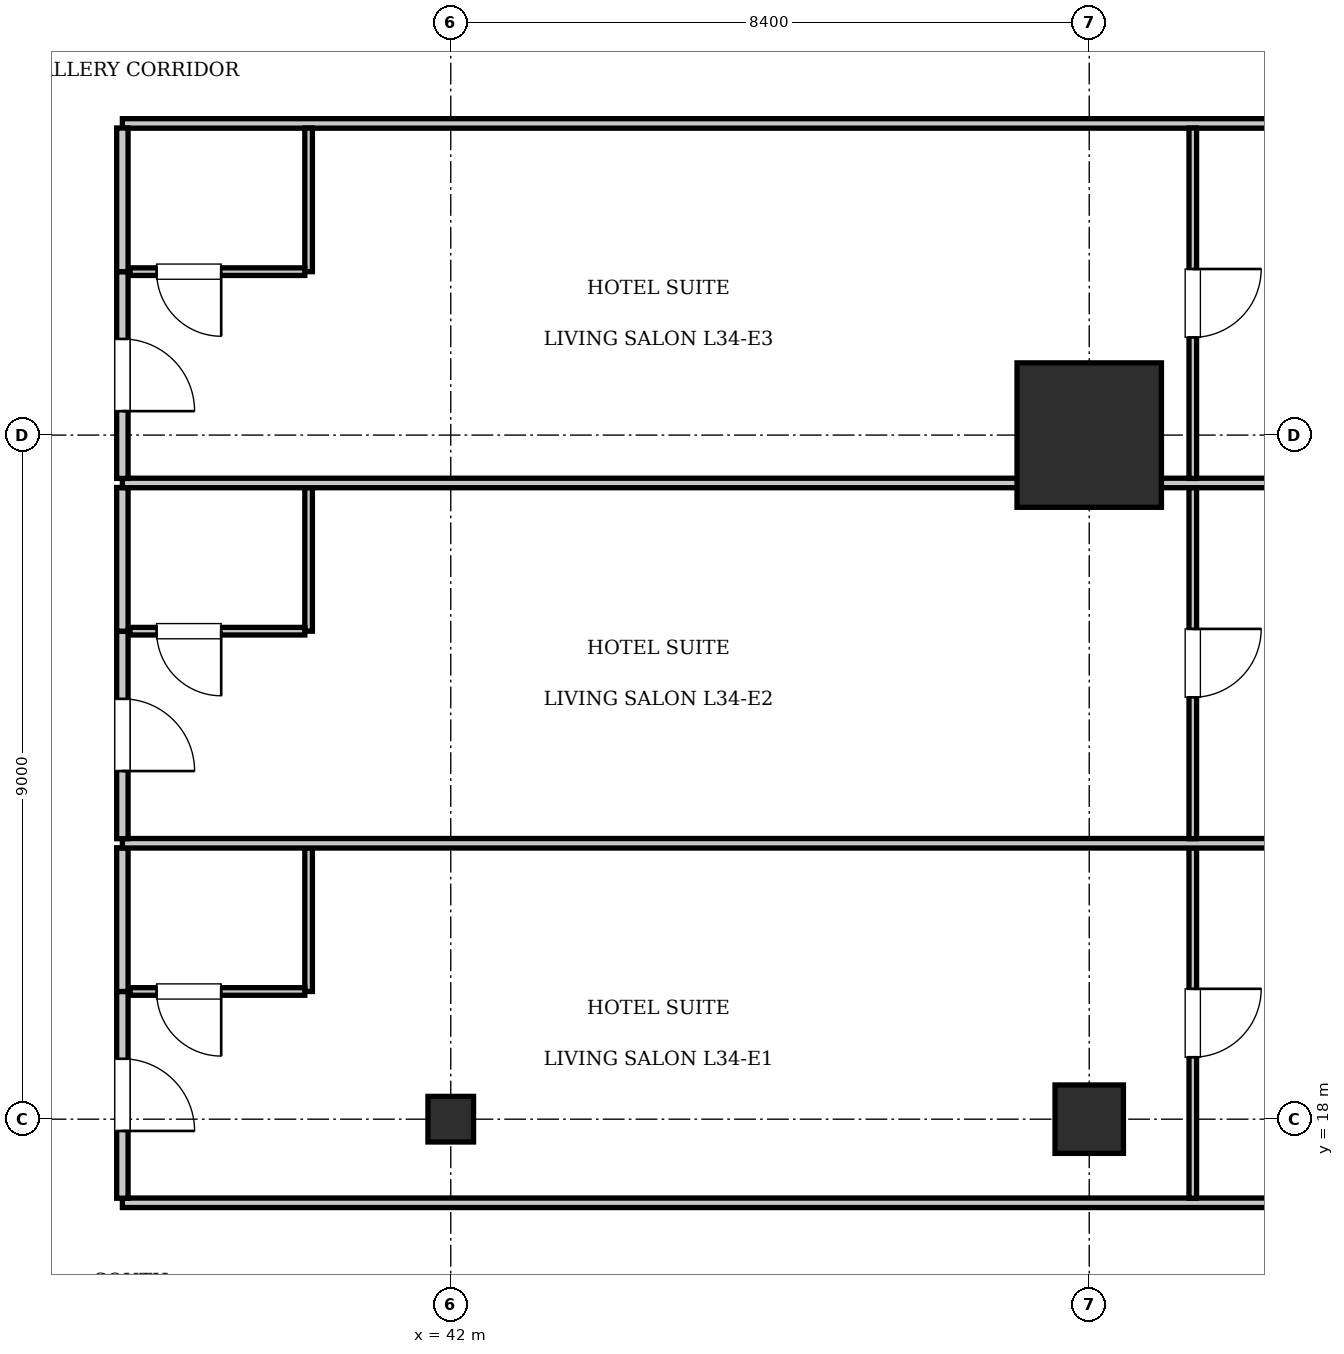
"""IFC4 building model, lengths in metres.
Left out: names, types, materials, properties, quantities, classifications, styles, units other than length and angle.
Written with IfcOpenShell. Run it as: python <this file> out.ifc"""

import sys

from ifc_helpers import new_model, si_unit, direction, frame, frame_2d, origin, origin_2d, place, context, subcontext, project, spatial, rectangle, i_section, extrude, element, fill, save


model = new_model("IFC4")
c1 = context("Model", 3, precision=1e-05, world=origin(), true_north=direction((0.0, 1.0)))
c2 = subcontext(c1, "Body", "Model", "MODEL_VIEW")
j1 = project(units=[si_unit("LENGTHUNIT", "METRE"), si_unit("PLANEANGLEUNIT", "RADIAN")], contexts=[c1])
p1 = place(None, origin())
s1 = spatial("IfcSite", under=j1, at=p1, CompositionType="ELEMENT")
p2 = place(p1, origin())
s2 = spatial("IfcBuilding", under=s1, at=p2, CompositionType="ELEMENT")
p3 = place(p2, frame((0.0, 0.0, 142.8)))
s3 = spatial("IfcBuildingStorey", under=s2, at=p3, CompositionType="ELEMENT", Elevation=142.8)
p4 = place(p3, frame((50.4, 27.0, 0.0), z_axis=(0.0, 0.0, 1.0), x_axis=(1.0, 0.0, 0.0)))
e1 = element("IfcColumn", 1, at=p4, inside=s3, PredefinedType="COLUMN", context=c2, shape_type="SweptSolid", body=[
    extrude(rectangle(XDim=1.9, YDim=1.9, at=origin_2d()), origin(), (0.0, 0.0, 1.0), 3.85),
])
p5 = place(p3, frame((50.4, 18.0, 0.0), z_axis=(0.0, 0.0, 1.0), x_axis=(1.0, 0.0, 0.0)))
e2 = element("IfcColumn", 2, at=p5, inside=s3, PredefinedType="COLUMN", context=c2, shape_type="SweptSolid", body=[
    extrude(rectangle(XDim=0.9, YDim=0.9, at=origin_2d()), origin(), (0.0, 0.0, 1.0), 3.85),
])
p6 = place(p3, frame((42.0, 18.0, 0.0), z_axis=(0.0, 0.0, 1.0), x_axis=(1.0, 0.0, 0.0)))
e3 = element("IfcColumn", 3, at=p6, inside=s3, PredefinedType="COLUMN", context=c2, shape_type="SweptSolid", body=[
    extrude(i_section(OverallWidth=0.6, OverallDepth=0.6, WebThickness=0.025, FlangeThickness=0.038, at=origin_2d()), origin(), (0.0, 0.0, 1.0), 3.85),
])
for number, where, z_axis, x_axis in (
    (4, (37.68, 16.9, 0.0), (0.0, 0.0, 1.0), (1.0, 0.0, 0.0)),
    (5, (37.68, 31.1, 0.0), (0.0, 0.0, 1.0), (1.0, 0.0, 0.0)),
):
    element("IfcWall", number, at=place(p3, frame(where, z_axis=z_axis, x_axis=x_axis)), inside=s3, PredefinedType="PARTITIONING", context=c2, shape_type="SweptSolid", body=[
        extrude(rectangle(XDim=24.72, YDim=0.125, at=frame_2d((12.36, 0.0))), origin(), (0.0, 0.0, 1.0), 3.61),
    ])
p7 = place(p3, frame((37.68, 16.96, 0.0), z_axis=(0.0, 0.0, 1.0), x_axis=(0.0, 1.0, 0.0)))
e6 = element("IfcWall", 6, at=p7, inside=s3, PredefinedType="PARTITIONING", context=c2, shape_type="SweptSolid", body=[
    extrude(rectangle(XDim=2.72, YDim=0.15, at=frame_2d((1.36, 0.0))), origin(), (0.0, 0.0, 1.0), 3.304),
])
p8 = place(p7, frame((0.885, 0.0, 0.0)))
e7 = element("IfcOpeningElement", 7, at=p8, cuts=e6, PredefinedType="OPENING", context=c2, shape_type="SweptSolid", body=[
    extrude(rectangle(XDim=0.95, YDim=2.15, at=frame_2d((0.475, 1.075))), frame((0.0, 0.085, 0.0), z_axis=(0.0, -1.0, 0.0), x_axis=(1.0, 0.0, 0.0)), (0.0, 0.0, 1.0), 0.17),
])
p9 = place(p3, frame((37.68, 19.68, 0.0), z_axis=(0.0, 0.0, 1.0), x_axis=(0.0, 1.0, 0.0)))
e8 = element("IfcWall", 8, at=p9, inside=s3, PredefinedType="PARTITIONING", context=c2, shape_type="SweptSolid", body=[
    extrude(rectangle(XDim=1.89, YDim=0.15, at=frame_2d((0.945, 0.0))), origin(), (0.0, 0.0, 1.0), 3.61),
])
p10 = place(p3, frame((40.13, 19.68, 0.0), z_axis=(0.0, 0.0, 1.0), x_axis=(0.0, 1.0, 0.0)))
e9 = element("IfcWall", 9, at=p10, inside=s3, PredefinedType="PARTITIONING", context=c2, shape_type="SweptSolid", body=[
    extrude(rectangle(XDim=1.89, YDim=0.1, at=frame_2d((0.945, 0.0))), origin(), (0.0, 0.0, 1.0), 3.61),
])
p11 = place(p3, frame((37.78, 19.68, 0.0), z_axis=(0.0, 0.0, 1.0), x_axis=(1.0, 0.0, 0.0)))
e10 = element("IfcWall", 10, at=p11, inside=s3, PredefinedType="PARTITIONING", context=c2, shape_type="SweptSolid", body=[
    extrude(rectangle(XDim=2.3, YDim=0.1, at=frame_2d((1.15, 0.0))), origin(), (0.0, 0.0, 1.0), 3.61),
])
p12 = place(p11, frame((0.35, 0.0, 0.0)))
e11 = element("IfcOpeningElement", 11, at=p12, cuts=e10, PredefinedType="OPENING", context=c2, shape_type="SweptSolid", body=[
    extrude(rectangle(XDim=0.85, YDim=2.1, at=frame_2d((0.425, 1.05))), frame((0.0, 0.06, 0.0), z_axis=(0.0, -1.0, 0.0), x_axis=(1.0, 0.0, 0.0)), (0.0, 0.0, 1.0), 0.12),
])
p13 = place(p3, frame((51.762, 16.96, 0.0), z_axis=(0.0, 0.0, 1.0), x_axis=(0.0, 1.0, 0.0)))
e12 = element("IfcWall", 12, at=p13, inside=s3, PredefinedType="PARTITIONING", context=c2, shape_type="SweptSolid", body=[
    extrude(rectangle(XDim=4.61, YDim=0.1, at=frame_2d((2.305, 0.0))), origin(), (0.0, 0.0, 1.0), 3.61),
])
p14 = place(p13, frame((1.855, 0.0, 0.0)))
e13 = element("IfcOpeningElement", 13, at=p14, cuts=e12, PredefinedType="OPENING", context=c2, shape_type="SweptSolid", body=[
    extrude(rectangle(XDim=0.9, YDim=2.1, at=frame_2d((0.45, 1.05))), frame((0.0, 0.06, 0.0), z_axis=(0.0, -1.0, 0.0), x_axis=(1.0, 0.0, 0.0)), (0.0, 0.0, 1.0), 0.12),
])
p15 = place(p3, frame((37.68, 21.63, 0.0), z_axis=(0.0, 0.0, 1.0), x_axis=(1.0, 0.0, 0.0)))
e14 = element("IfcWall", 14, at=p15, inside=s3, PredefinedType="PARTITIONING", context=c2, shape_type="SweptSolid", body=[
    extrude(rectangle(XDim=24.72, YDim=0.125, at=frame_2d((12.36, 0.0))), origin(), (0.0, 0.0, 1.0), 3.61),
])
p16 = place(p3, frame((37.68, 21.69, 0.0), z_axis=(0.0, 0.0, 1.0), x_axis=(0.0, 1.0, 0.0)))
e15 = element("IfcWall", 15, at=p16, inside=s3, PredefinedType="PARTITIONING", context=c2, shape_type="SweptSolid", body=[
    extrude(rectangle(XDim=2.73, YDim=0.15, at=frame_2d((1.365, 0.0))), origin(), (0.0, 0.0, 1.0), 3.61),
])
p17 = place(p16, frame((0.89, 0.0, 0.0)))
e16 = element("IfcOpeningElement", 16, at=p17, cuts=e15, PredefinedType="OPENING", context=c2, shape_type="SweptSolid", body=[
    extrude(rectangle(XDim=0.95, YDim=2.15, at=frame_2d((0.475, 1.075))), frame((0.0, 0.085, 0.0), z_axis=(0.0, -1.0, 0.0), x_axis=(1.0, 0.0, 0.0)), (0.0, 0.0, 1.0), 0.17),
])
p18 = place(p3, frame((37.68, 24.42, 0.0), z_axis=(0.0, 0.0, 1.0), x_axis=(0.0, 1.0, 0.0)))
e17 = element("IfcWall", 17, at=p18, inside=s3, PredefinedType="PARTITIONING", context=c2, shape_type="SweptSolid", body=[
    extrude(rectangle(XDim=1.89, YDim=0.15, at=frame_2d((0.945, 0.0))), origin(), (0.0, 0.0, 1.0), 3.61),
])
p19 = place(p3, frame((40.13, 24.42, 0.0), z_axis=(0.0, 0.0, 1.0), x_axis=(0.0, 1.0, 0.0)))
e18 = element("IfcWall", 18, at=p19, inside=s3, PredefinedType="PARTITIONING", context=c2, shape_type="SweptSolid", body=[
    extrude(rectangle(XDim=1.89, YDim=0.1, at=frame_2d((0.945, 0.0))), origin(), (0.0, 0.0, 1.0), 3.61),
])
p20 = place(p3, frame((37.78, 24.42, 0.0), z_axis=(0.0, 0.0, 1.0), x_axis=(1.0, 0.0, 0.0)))
e19 = element("IfcWall", 19, at=p20, inside=s3, PredefinedType="PARTITIONING", context=c2, shape_type="SweptSolid", body=[
    extrude(rectangle(XDim=2.3, YDim=0.1, at=frame_2d((1.15, 0.0))), origin(), (0.0, 0.0, 1.0), 3.61),
])
p21 = place(p20, frame((0.35, 0.0, 0.0)))
e20 = element("IfcOpeningElement", 20, at=p21, cuts=e19, PredefinedType="OPENING", context=c2, shape_type="SweptSolid", body=[
    extrude(rectangle(XDim=0.85, YDim=2.1, at=frame_2d((0.425, 1.05))), frame((0.0, 0.06, 0.0), z_axis=(0.0, -1.0, 0.0), x_axis=(1.0, 0.0, 0.0)), (0.0, 0.0, 1.0), 0.12),
])
p22 = place(p3, frame((51.762, 21.69, 0.0), z_axis=(0.0, 0.0, 1.0), x_axis=(0.0, 1.0, 0.0)))
e21 = element("IfcWall", 21, at=p22, inside=s3, PredefinedType="PARTITIONING", context=c2, shape_type="SweptSolid", body=[
    extrude(rectangle(XDim=4.62, YDim=0.1, at=frame_2d((2.31, 0.0))), origin(), (0.0, 0.0, 1.0), 3.61),
])
p23 = place(p22, frame((1.86, 0.0, 0.0)))
e22 = element("IfcOpeningElement", 22, at=p23, cuts=e21, PredefinedType="OPENING", context=c2, shape_type="SweptSolid", body=[
    extrude(rectangle(XDim=0.9, YDim=2.1, at=frame_2d((0.45, 1.05))), frame((0.0, 0.06, 0.0), z_axis=(0.0, -1.0, 0.0), x_axis=(1.0, 0.0, 0.0)), (0.0, 0.0, 1.0), 0.12),
])
p24 = place(p3, frame((37.68, 26.37, 0.0), z_axis=(0.0, 0.0, 1.0), x_axis=(1.0, 0.0, 0.0)))
e23 = element("IfcWall", 23, at=p24, inside=s3, PredefinedType="PARTITIONING", context=c2, shape_type="SweptSolid", body=[
    extrude(rectangle(XDim=24.72, YDim=0.125, at=frame_2d((12.36, 0.0))), origin(), (0.0, 0.0, 1.0), 3.61),
])
p25 = place(p3, frame((37.68, 26.43, 0.0), z_axis=(0.0, 0.0, 1.0), x_axis=(0.0, 1.0, 0.0)))
e24 = element("IfcWall", 24, at=p25, inside=s3, PredefinedType="PARTITIONING", context=c2, shape_type="SweptSolid", body=[
    extrude(rectangle(XDim=2.72, YDim=0.15, at=frame_2d((1.36, 0.0))), origin(), (0.0, 0.0, 1.0), 3.61),
])
p26 = place(p25, frame((0.885, 0.0, 0.0)))
e25 = element("IfcOpeningElement", 25, at=p26, cuts=e24, PredefinedType="OPENING", context=c2, shape_type="SweptSolid", body=[
    extrude(rectangle(XDim=0.95, YDim=2.15, at=frame_2d((0.475, 1.075))), frame((0.0, 0.085, 0.0), z_axis=(0.0, -1.0, 0.0), x_axis=(1.0, 0.0, 0.0)), (0.0, 0.0, 1.0), 0.17),
])
p27 = place(p3, frame((37.68, 29.15, 0.0), z_axis=(0.0, 0.0, 1.0), x_axis=(0.0, 1.0, 0.0)))
e26 = element("IfcWall", 26, at=p27, inside=s3, PredefinedType="PARTITIONING", context=c2, shape_type="SweptSolid", body=[
    extrude(rectangle(XDim=1.89, YDim=0.15, at=frame_2d((0.945, 0.0))), origin(), (0.0, 0.0, 1.0), 3.61),
])
p28 = place(p3, frame((40.13, 29.15, 0.0), z_axis=(0.0, 0.0, 1.0), x_axis=(0.0, 1.0, 0.0)))
e27 = element("IfcWall", 27, at=p28, inside=s3, PredefinedType="PARTITIONING", context=c2, shape_type="SweptSolid", body=[
    extrude(rectangle(XDim=1.89, YDim=0.1, at=frame_2d((0.945, 0.0))), origin(), (0.0, 0.0, 1.0), 3.61),
])
p29 = place(p3, frame((37.78, 29.15, 0.0), z_axis=(0.0, 0.0, 1.0), x_axis=(1.0, 0.0, 0.0)))
e28 = element("IfcWall", 28, at=p29, inside=s3, PredefinedType="PARTITIONING", context=c2, shape_type="SweptSolid", body=[
    extrude(rectangle(XDim=2.3, YDim=0.1, at=frame_2d((1.15, 0.0))), origin(), (0.0, 0.0, 1.0), 3.61),
])
p30 = place(p29, frame((0.35, 0.0, 0.0)))
e29 = element("IfcOpeningElement", 29, at=p30, cuts=e28, PredefinedType="OPENING", context=c2, shape_type="SweptSolid", body=[
    extrude(rectangle(XDim=0.85, YDim=2.1, at=frame_2d((0.425, 1.05))), frame((0.0, 0.06, 0.0), z_axis=(0.0, -1.0, 0.0), x_axis=(1.0, 0.0, 0.0)), (0.0, 0.0, 1.0), 0.12),
])
p31 = place(p3, frame((51.762, 26.43, 0.0), z_axis=(0.0, 0.0, 1.0), x_axis=(0.0, 1.0, 0.0)))
e30 = element("IfcWall", 30, at=p31, inside=s3, PredefinedType="PARTITIONING", context=c2, shape_type="SweptSolid", body=[
    extrude(rectangle(XDim=4.61, YDim=0.1, at=frame_2d((2.305, 0.0))), origin(), (0.0, 0.0, 1.0), 3.61),
])
p32 = place(p31, frame((1.855, 0.0, 0.0)))
e31 = element("IfcOpeningElement", 31, at=p32, cuts=e30, PredefinedType="OPENING", context=c2, shape_type="SweptSolid", body=[
    extrude(rectangle(XDim=0.9, YDim=2.1, at=frame_2d((0.45, 1.05))), frame((0.0, 0.06, 0.0), z_axis=(0.0, -1.0, 0.0), x_axis=(1.0, 0.0, 0.0)), (0.0, 0.0, 1.0), 0.12),
])
p33 = place(p12, frame((0.85, 0.0, 0.0), z_axis=(0.0, 0.0, 1.0), x_axis=(-1.0, 0.0, 0.0)))
e32 = element("IfcDoor", 32, at=p33, inside=s3, OperationType="SINGLE_SWING_LEFT", PredefinedType="DOOR", context=c2, shape_type="SweptSolid", body=[
    extrude(rectangle(XDim=0.85, YDim=2.1, at=frame_2d((0.425, 1.05))), frame((0.0, 0.025, 0.0), z_axis=(0.0, -1.0, 0.0), x_axis=(1.0, 0.0, 0.0)), (0.0, 0.0, 1.0), 0.05),
])
fill(e11, e32)
p34 = place(p8, frame((0.95, 0.0, 0.0), z_axis=(0.0, 0.0, 1.0), x_axis=(-1.0, 0.0, 0.0)))
e33 = element("IfcDoor", 33, at=p34, inside=s3, OperationType="SINGLE_SWING_RIGHT", PredefinedType="DOOR", context=c2, shape_type="SweptSolid", body=[
    extrude(rectangle(XDim=0.95, YDim=2.15, at=frame_2d((0.475, 1.075))), frame((0.0, 0.025, 0.0), z_axis=(0.0, -1.0, 0.0), x_axis=(1.0, 0.0, 0.0)), (0.0, 0.0, 1.0), 0.05),
])
fill(e7, e33)
p35 = place(p14, frame((0.9, 0.0, 0.0), z_axis=(0.0, 0.0, 1.0), x_axis=(-1.0, 0.0, 0.0)))
e34 = element("IfcDoor", 34, at=p35, inside=s3, OperationType="SINGLE_SWING_LEFT", PredefinedType="DOOR", context=c2, shape_type="SweptSolid", body=[
    extrude(rectangle(XDim=0.9, YDim=2.1, at=frame_2d((0.45, 1.05))), frame((0.0, 0.025, 0.0), z_axis=(0.0, -1.0, 0.0), x_axis=(1.0, 0.0, 0.0)), (0.0, 0.0, 1.0), 0.05),
])
fill(e13, e34)
p36 = place(p21, frame((0.85, 0.0, 0.0), z_axis=(0.0, 0.0, 1.0), x_axis=(-1.0, 0.0, 0.0)))
e35 = element("IfcDoor", 35, at=p36, inside=s3, OperationType="SINGLE_SWING_LEFT", PredefinedType="DOOR", context=c2, shape_type="SweptSolid", body=[
    extrude(rectangle(XDim=0.85, YDim=2.1, at=frame_2d((0.425, 1.05))), frame((0.0, 0.025, 0.0), z_axis=(0.0, -1.0, 0.0), x_axis=(1.0, 0.0, 0.0)), (0.0, 0.0, 1.0), 0.05),
])
fill(e20, e35)
p37 = place(p17, frame((0.95, 0.0, 0.0), z_axis=(0.0, 0.0, 1.0), x_axis=(-1.0, 0.0, 0.0)))
e36 = element("IfcDoor", 36, at=p37, inside=s3, OperationType="SINGLE_SWING_RIGHT", PredefinedType="DOOR", context=c2, shape_type="SweptSolid", body=[
    extrude(rectangle(XDim=0.95, YDim=2.15, at=frame_2d((0.475, 1.075))), frame((0.0, 0.025, 0.0), z_axis=(0.0, -1.0, 0.0), x_axis=(1.0, 0.0, 0.0)), (0.0, 0.0, 1.0), 0.05),
])
fill(e16, e36)
p38 = place(p23, frame((0.9, 0.0, 0.0), z_axis=(0.0, 0.0, 1.0), x_axis=(-1.0, 0.0, 0.0)))
e37 = element("IfcDoor", 37, at=p38, inside=s3, OperationType="SINGLE_SWING_LEFT", PredefinedType="DOOR", context=c2, shape_type="SweptSolid", body=[
    extrude(rectangle(XDim=0.9, YDim=2.1, at=frame_2d((0.45, 1.05))), frame((0.0, 0.025, 0.0), z_axis=(0.0, -1.0, 0.0), x_axis=(1.0, 0.0, 0.0)), (0.0, 0.0, 1.0), 0.05),
])
fill(e22, e37)
p39 = place(p30, frame((0.85, 0.0, 0.0), z_axis=(0.0, 0.0, 1.0), x_axis=(-1.0, 0.0, 0.0)))
e38 = element("IfcDoor", 38, at=p39, inside=s3, OperationType="SINGLE_SWING_LEFT", PredefinedType="DOOR", context=c2, shape_type="SweptSolid", body=[
    extrude(rectangle(XDim=0.85, YDim=2.1, at=frame_2d((0.425, 1.05))), frame((0.0, 0.025, 0.0), z_axis=(0.0, -1.0, 0.0), x_axis=(1.0, 0.0, 0.0)), (0.0, 0.0, 1.0), 0.05),
])
fill(e29, e38)
p40 = place(p26, frame((0.95, 0.0, 0.0), z_axis=(0.0, 0.0, 1.0), x_axis=(-1.0, 0.0, 0.0)))
e39 = element("IfcDoor", 39, at=p40, inside=s3, OperationType="SINGLE_SWING_RIGHT", PredefinedType="DOOR", context=c2, shape_type="SweptSolid", body=[
    extrude(rectangle(XDim=0.95, YDim=2.15, at=frame_2d((0.475, 1.075))), frame((0.0, 0.025, 0.0), z_axis=(0.0, -1.0, 0.0), x_axis=(1.0, 0.0, 0.0)), (0.0, 0.0, 1.0), 0.05),
])
fill(e25, e39)
p41 = place(p32, frame((0.9, 0.0, 0.0), z_axis=(0.0, 0.0, 1.0), x_axis=(-1.0, 0.0, 0.0)))
e40 = element("IfcDoor", 40, at=p41, inside=s3, OperationType="SINGLE_SWING_LEFT", PredefinedType="DOOR", context=c2, shape_type="SweptSolid", body=[
    extrude(rectangle(XDim=0.9, YDim=2.1, at=frame_2d((0.45, 1.05))), frame((0.0, 0.025, 0.0), z_axis=(0.0, -1.0, 0.0), x_axis=(1.0, 0.0, 0.0)), (0.0, 0.0, 1.0), 0.05),
])
fill(e31, e40)
save(model, sys.argv[1])
